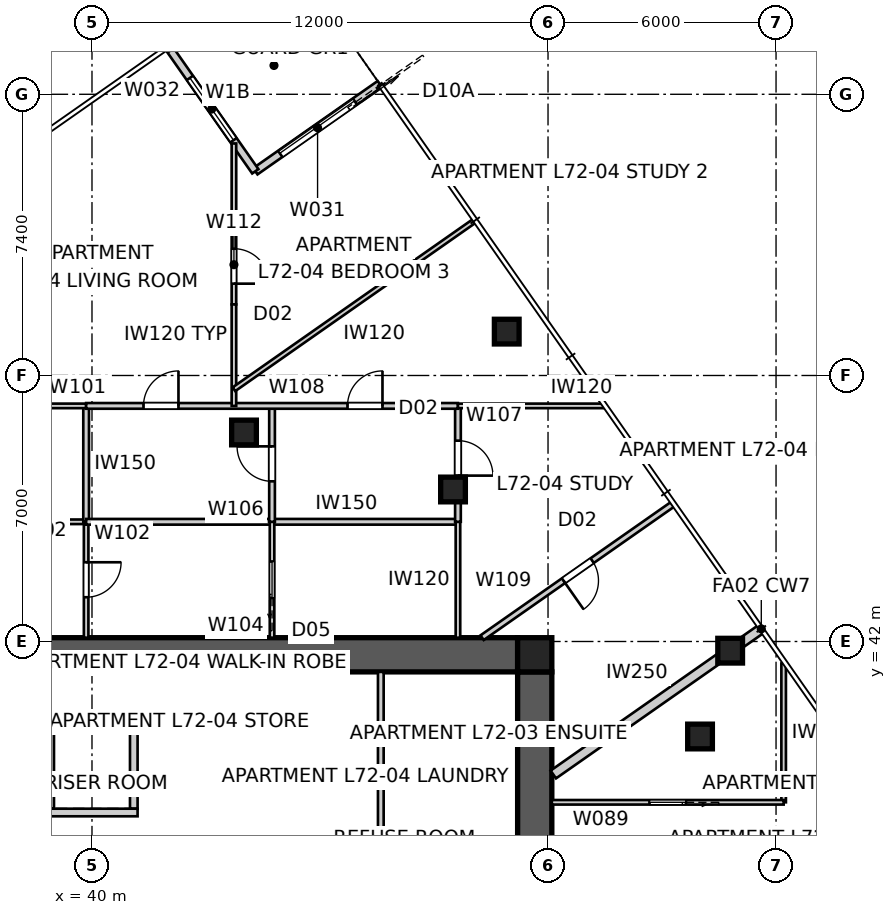
"""IFC4 building model, lengths in metres.
Left out: names, types, materials, properties, quantities, classifications, styles, units other than length and angle.
Written with IfcOpenShell. Run it as: python <this file> out.ifc"""

import sys

from ifc_helpers import new_model, si_unit, direction, frame, frame_2d, origin, origin_2d, place, context, subcontext, project, spatial, polyline, rectangle, outline, extrude, element, fill, save


model = new_model("IFC4")
c1 = context("Model", 3, precision=1e-05, world=origin(), true_north=direction((0.0, 1.0)))
c2 = subcontext(c1, "Body", "Model", "MODEL_VIEW")
j1 = project(units=[si_unit("LENGTHUNIT", "METRE"), si_unit("PLANEANGLEUNIT", "RADIAN")], contexts=[c1])
p1 = place(None, origin())
s1 = spatial("IfcSite", under=j1, at=p1, CompositionType="ELEMENT")
p2 = place(p1, origin())
s2 = spatial("IfcBuilding", under=s1, at=p2, CompositionType="ELEMENT")
p3 = place(p2, frame((0.0, 0.0, 260.8)))
s3 = spatial("IfcBuildingStorey", under=s2, at=p3, CompositionType="ELEMENT", Elevation=260.8)
p4 = place(p3, frame((28.8, 41.65, 0.0), z_axis=(0.0, 0.0, 1.0), x_axis=(1.0, 0.0, 0.0)))
e1 = element("IfcWall", 1, at=p4, inside=s3, PredefinedType="SHEAR", context=c2, shape_type="SweptSolid", body=[
    extrude(outline(polyline([(0.0, -0.45), (22.4, -0.45), (22.4, -0.025), (22.85, -0.025), (22.85, 0.025), (22.4, 0.025), (22.4, 0.45), (0.0, 0.45), (0.0, 0.025), (-0.45, 0.025), (-0.45, -0.025), (0.0, -0.025), (0.0, -0.45)])), origin(), (0.0, 0.0, 1.0), 3.4),
])
p5 = place(p3, frame((51.65, 18.8, 0.0), z_axis=(0.0, 0.0, 1.0), x_axis=(0.0, 1.0, 0.0)))
e2 = element("IfcWall", 2, at=p5, inside=s3, PredefinedType="SHEAR", context=c2, shape_type="SweptSolid", body=[
    extrude(outline(polyline([(0.0, -0.45), (22.4, -0.45), (22.4, -0.025), (22.85, -0.025), (22.85, 0.025), (22.4, 0.025), (22.4, 0.45), (0.0, 0.45), (0.0, 0.025), (-0.45, 0.025), (-0.45, -0.025), (0.0, -0.025), (0.0, -0.45)])), origin(), (0.0, 0.0, 1.0), 3.4),
])
p6 = place(p5, frame((11.14, 0.0, 0.0)))
e3 = element("IfcOpeningElement", 3, at=p6, cuts=e2, PredefinedType="OPENING", context=c2, shape_type="SweptSolid", body=[
    extrude(rectangle(XDim=1.02, YDim=2.4, at=frame_2d((0.51, 1.2))), frame((0.0, 0.46, 0.0), z_axis=(0.0, -1.0, 0.0), x_axis=(1.0, 0.0, 0.0)), (0.0, 0.0, 1.0), 0.92),
])
for number, where, z_axis, x_axis in (
    (4, (38.9, 37.6, 0.0), (0.0, 0.0, 1.0), (0.0, 1.0, 0.0)),
    (5, (41.1, 37.6, 0.0), (0.0, 0.0, 1.0), (0.0, 1.0, 0.0)),
):
    element("IfcWall", number, at=place(p3, frame(where, z_axis=z_axis, x_axis=x_axis)), inside=s3, PredefinedType="SOLIDWALL", context=c2, shape_type="SweptSolid", body=[
        extrude(rectangle(XDim=2.0, YDim=0.2, at=frame_2d((1.0, 0.0))), origin(), (0.0, 0.0, 1.0), 3.4),
    ])
for number, where, z_axis, x_axis in (
    (6, (38.8, 37.5, 0.0), (0.0, 0.0, 1.0), (1.0, 0.0, 0.0)),
    (7, (38.8, 39.7, 0.0), (0.0, 0.0, 1.0), (1.0, 0.0, 0.0)),
):
    element("IfcWall", number, at=place(p3, frame(where, z_axis=z_axis, x_axis=x_axis)), inside=s3, PredefinedType="SOLIDWALL", context=c2, shape_type="SweptSolid", body=[
        extrude(rectangle(XDim=2.4, YDim=0.2, at=frame_2d((1.2, 0.0))), origin(), (0.0, 0.0, 1.0), 3.4),
    ])
p7 = place(p3, frame((51.65, 41.65, 0.0), z_axis=(0.0, 0.0, 1.0), x_axis=(1.0, 0.0, 0.0)))
e8 = element("IfcColumn", 8, at=p7, inside=s3, PredefinedType="COLUMN", context=c2, shape_type="SweptSolid", body=[
    extrude(rectangle(XDim=0.9, YDim=0.9, at=origin_2d()), origin(), (0.0, 0.0, 1.0), 3.4),
])
for number, where, z_axis, x_axis in (
    (9, (56.793, 41.758, 0.0), (0.0, 0.0, 1.0), (1.0, 0.0, 0.0)),
    (10, (50.914, 50.155, 0.0), (0.0, 0.0, 1.0), (1.0, 0.0, 0.0)),
    (11, (56.0, 39.5, 0.0), (0.0, 0.0, 1.0), (1.0, 0.0, 0.0)),
    (12, (49.5, 46.0, 0.0), (0.0, 0.0, 1.0), (1.0, 0.0, 0.0)),
    (13, (44.0, 47.5, 0.0), (0.0, 0.0, 1.0), (1.0, 0.0, 0.0)),
):
    element("IfcColumn", number, at=place(p3, frame(where, z_axis=z_axis, x_axis=x_axis)), inside=s3, PredefinedType="COLUMN", context=c2, shape_type="SweptSolid", body=[
        extrude(rectangle(XDim=0.65, YDim=0.65, at=origin_2d()), origin(), (0.0, 0.0, 1.0), 3.4),
    ])
p8 = place(p3, frame((47.574, 56.667, 0.0), z_axis=(0.0, 0.0, 1.0), x_axis=(-0.819165963305, -0.573556557423, 0.0)))
e14 = element("IfcWall", 14, at=p8, inside=s3, PredefinedType="SOLIDWALL", context=c2, shape_type="SweptSolid", body=[
    extrude(rectangle(XDim=4.0, YDim=0.2, at=frame_2d((2.0, 0.0))), origin(), (0.0, 0.0, 1.0), 3.25),
])
p9 = place(p8, frame((0.8, 0.0, 0.0)))
e15 = element("IfcOpeningElement", 15, at=p9, cuts=e14, PredefinedType="OPENING", context=c2, shape_type="SweptSolid", body=[
    extrude(rectangle(XDim=2.4, YDim=2.1, at=frame_2d((1.2, 1.05))), frame((0.0, 0.11, 0.0), z_axis=(0.0, -1.0, 0.0), x_axis=(1.0, 0.0, 0.0)), (0.0, 0.0, 1.0), 0.22),
])
p10 = place(p3, frame((44.298, 54.373, 0.0), z_axis=(0.0, 0.0, 1.0), x_axis=(-0.573597512525, 0.819137286189, 0.0)))
e16 = element("IfcWall", 16, at=p10, inside=s3, PredefinedType="SOLIDWALL", context=c2, shape_type="SweptSolid", body=[
    extrude(rectangle(XDim=4.0, YDim=0.2, at=frame_2d((2.0, 0.0))), origin(), (0.0, 0.0, 1.0), 3.25),
])
p11 = place(p10, frame((1.0, 0.0, 0.45)))
e17 = element("IfcOpeningElement", 17, at=p11, cuts=e16, PredefinedType="OPENING", context=c2, shape_type="SweptSolid", body=[
    extrude(rectangle(XDim=2.0, YDim=1.8, at=frame_2d((1.0, 0.9))), frame((0.0, 0.11, 0.0), z_axis=(0.0, -1.0, 0.0), x_axis=(1.0, 0.0, 0.0)), (0.0, 0.0, 1.0), 0.22),
])
p12 = place(p3, frame((57.612, 42.332, 0.0), z_axis=(0.0, 0.0, 1.0), x_axis=(-0.819161528122, -0.573562891796, 0.0)))
e18 = element("IfcWall", 18, at=p12, inside=s3, PredefinedType="PARTITIONING", context=c2, shape_type="SweptSolid", body=[
    extrude(rectangle(XDim=6.681, YDim=0.25, at=frame_2d((3.341, 0.0))), origin(), (0.0, 0.0, 1.0), 3.25),
])
p13 = place(p3, frame((47.6, 41.2, 0.0), z_axis=(0.0, 0.0, 1.0), x_axis=(0.0, -1.0, 0.0)))
e19 = element("IfcWall", 19, at=p13, inside=s3, PredefinedType="SOLIDWALL", context=c2, shape_type="SweptSolid", body=[
    extrude(rectangle(XDim=5.9, YDim=0.15, at=frame_2d((2.95, 0.0))), origin(), (0.0, 0.0, 1.0), 3.25),
])
p14 = place(p3, frame((58.2, 41.422, 0.0), z_axis=(0.0, 0.0, 1.0), x_axis=(0.0, -1.0, 0.0)))
e20 = element("IfcWall", 20, at=p14, inside=s3, PredefinedType="PARTITIONING", context=c2, shape_type="SweptSolid", body=[
    extrude(rectangle(XDim=3.654, YDim=0.12, at=frame_2d((1.827, 0.0))), origin(), (0.0, 0.0, 1.0), 3.25),
])
p15 = place(p3, frame((58.2, 37.768, 0.0), z_axis=(0.0, 0.0, 1.0), x_axis=(-1.0, 0.0, 0.0)))
e21 = element("IfcWall", 21, at=p15, inside=s3, PredefinedType="PARTITIONING", context=c2, shape_type="SweptSolid", body=[
    extrude(rectangle(XDim=6.1, YDim=0.12, at=frame_2d((3.05, 0.0))), origin(), (0.0, 0.0, 1.0), 3.25),
])
p16 = place(p15, frame((2.57, 0.0, 0.0)))
e22 = element("IfcOpeningElement", 22, at=p16, cuts=e21, PredefinedType="OPENING", context=c2, shape_type="SweptSolid", body=[
    extrude(rectangle(XDim=0.96, YDim=2.1, at=frame_2d((0.48, 1.05))), frame((0.0, 0.07, 0.0), z_axis=(0.0, -1.0, 0.0), x_axis=(1.0, 0.0, 0.0)), (0.0, 0.0, 1.0), 0.14),
])
p17 = place(p3, frame((28.255, 45.148, 0.0), z_axis=(0.0, 0.0, 1.0), x_axis=(0.99999998913, 0.000147442917, 0.0)))
e23 = element("IfcWall", 23, at=p17, inside=s3, PredefinedType="PARTITIONING", context=c2, shape_type="SweptSolid", body=[
    extrude(rectangle(XDim=11.591, YDim=0.12, at=frame_2d((5.795, 0.0))), origin(), (0.0, 0.0, 1.0), 3.25),
])
p18 = place(p3, frame((39.846, 48.2, 0.0), z_axis=(0.0, 0.0, 1.0), x_axis=(0.0, -1.0, 0.0)))
e24 = element("IfcWall", 24, at=p18, inside=s3, PredefinedType="SOLIDWALL", context=c2, shape_type="SweptSolid", body=[
    extrude(rectangle(XDim=3.05, YDim=0.15, at=frame_2d((1.525, 0.0))), origin(), (0.0, 0.0, 1.0), 3.25),
])
p19 = place(p3, frame((33.907, 48.2, 0.0), z_axis=(0.0, 0.0, 1.0), x_axis=(1.0, 0.0, 0.0)))
e25 = element("IfcWall", 25, at=p19, inside=s3, PredefinedType="PARTITIONING", context=c2, shape_type="SweptSolid", body=[
    extrude(rectangle(XDim=5.939, YDim=0.12, at=frame_2d((2.969, 0.0))), origin(), (0.0, 0.0, 1.0), 3.25),
])
p20 = place(p19, frame((0.666, 0.0, 0.0)))
e26 = element("IfcOpeningElement", 26, at=p20, cuts=e25, PredefinedType="OPENING", context=c2, shape_type="SweptSolid", body=[
    extrude(rectangle(XDim=0.96, YDim=2.1, at=frame_2d((0.48, 1.05))), frame((0.0, 0.07, 0.0), z_axis=(0.0, -1.0, 0.0), x_axis=(1.0, 0.0, 0.0)), (0.0, 0.0, 1.0), 0.14),
])
p21 = place(p3, frame((39.846, 45.15, 0.0), z_axis=(0.0, 0.0, 1.0), x_axis=(0.0, -1.0, 0.0)))
e27 = element("IfcWall", 27, at=p21, inside=s3, PredefinedType="PARTITIONING", context=c2, shape_type="SweptSolid", body=[
    extrude(rectangle(XDim=3.05, YDim=0.12, at=frame_2d((1.525, 0.0))), origin(), (0.0, 0.0, 1.0), 3.25),
])
p22 = place(p21, frame((1.065, 0.0, 0.0)))
e28 = element("IfcOpeningElement", 28, at=p22, cuts=e27, PredefinedType="OPENING", context=c2, shape_type="SweptSolid", body=[
    extrude(rectangle(XDim=0.92, YDim=2.34, at=frame_2d((0.46, 1.17))), frame((0.0, 0.07, 0.0), z_axis=(0.0, -1.0, 0.0), x_axis=(1.0, 0.0, 0.0)), (0.0, 0.0, 1.0), 0.14),
])
p23 = place(p3, frame((39.846, 45.15, 0.0), z_axis=(0.0, 0.0, 1.0), x_axis=(1.0, 0.0, 0.0)))
e29 = element("IfcWall", 29, at=p23, inside=s3, PredefinedType="SOLIDWALL", context=c2, shape_type="SweptSolid", body=[
    extrude(rectangle(XDim=9.784, YDim=0.15, at=frame_2d((4.892, 0.0))), origin(), (0.0, 0.0, 1.0), 3.25),
])
p24 = place(p3, frame((44.738, 42.1, 0.0), z_axis=(0.0, 0.0, 1.0), x_axis=(0.0, 1.0, 0.0)))
e30 = element("IfcWall", 30, at=p24, inside=s3, PredefinedType="PARTITIONING", context=c2, shape_type="SweptSolid", body=[
    extrude(rectangle(XDim=3.05, YDim=0.12, at=frame_2d((1.525, 0.0))), origin(), (0.0, 0.0, 1.0), 3.25),
])
p25 = place(p24, frame((1.045, 0.0, 0.0)))
e31 = element("IfcOpeningElement", 31, at=p25, cuts=e30, PredefinedType="OPENING", context=c2, shape_type="SweptSolid", body=[
    extrude(rectangle(XDim=0.96, YDim=2.1, at=frame_2d((0.48, 1.05))), frame((0.0, 0.07, 0.0), z_axis=(0.0, -1.0, 0.0), x_axis=(1.0, 0.0, 0.0)), (0.0, 0.0, 1.0), 0.14),
])
p26 = place(p3, frame((49.63, 45.15, 0.0), z_axis=(0.0, 0.0, 1.0), x_axis=(0.0, -1.0, 0.0)))
e32 = element("IfcWall", 32, at=p26, inside=s3, PredefinedType="PARTITIONING", context=c2, shape_type="SweptSolid", body=[
    extrude(rectangle(XDim=3.05, YDim=0.12, at=frame_2d((1.525, 0.0))), origin(), (0.0, 0.0, 1.0), 3.25),
])
p27 = place(p3, frame((44.738, 45.15, 0.0), z_axis=(0.0, 0.0, 1.0), x_axis=(0.0, 1.0, 0.0)))
e33 = element("IfcWall", 33, at=p27, inside=s3, PredefinedType="SOLIDWALL", context=c2, shape_type="SweptSolid", body=[
    extrude(rectangle(XDim=3.05, YDim=0.15, at=frame_2d((1.525, 0.0))), origin(), (0.0, 0.0, 1.0), 3.25),
])
p28 = place(p27, frame((1.065, 0.0, 0.0)))
e34 = element("IfcOpeningElement", 34, at=p28, cuts=e33, PredefinedType="OPENING", context=c2, shape_type="SweptSolid", body=[
    extrude(rectangle(XDim=0.92, YDim=2.34, at=frame_2d((0.46, 1.17))), frame((0.0, 0.085, 0.0), z_axis=(0.0, -1.0, 0.0), x_axis=(1.0, 0.0, 0.0)), (0.0, 0.0, 1.0), 0.17),
])
p29 = place(p3, frame((49.63, 48.2, 0.0), z_axis=(0.0, 0.0, 1.0), x_axis=(0.0, -1.0, 0.0)))
e35 = element("IfcWall", 35, at=p29, inside=s3, PredefinedType="SOLIDWALL", context=c2, shape_type="SweptSolid", body=[
    extrude(rectangle(XDim=3.05, YDim=0.15, at=frame_2d((1.525, 0.0))), origin(), (0.0, 0.0, 1.0), 3.25),
])
p30 = place(p29, frame((0.915, 0.0, 0.0)))
e36 = element("IfcOpeningElement", 36, at=p30, cuts=e35, PredefinedType="OPENING", context=c2, shape_type="SweptSolid", body=[
    extrude(rectangle(XDim=0.92, YDim=2.34, at=frame_2d((0.46, 1.17))), frame((0.0, 0.085, 0.0), z_axis=(0.0, -1.0, 0.0), x_axis=(1.0, 0.0, 0.0)), (0.0, 0.0, 1.0), 0.17),
])
p31 = place(p3, frame((39.846, 48.2, 0.0), z_axis=(0.0, 0.0, 1.0), x_axis=(1.0, 0.0, 0.0)))
e37 = element("IfcWall", 37, at=p31, inside=s3, PredefinedType="SOLIDWALL", context=c2, shape_type="SweptSolid", body=[
    extrude(rectangle(XDim=9.784, YDim=0.15, at=frame_2d((4.892, 0.0))), origin(), (0.0, 0.0, 1.0), 3.25),
])
p32 = place(p31, frame((1.51, 0.0, 0.0)))
e38 = element("IfcOpeningElement", 38, at=p32, cuts=e37, PredefinedType="OPENING", context=c2, shape_type="SweptSolid", body=[
    extrude(rectangle(XDim=0.92, YDim=2.34, at=frame_2d((0.46, 1.17))), frame((0.0, 0.085, 0.0), z_axis=(0.0, -1.0, 0.0), x_axis=(1.0, 0.0, 0.0)), (0.0, 0.0, 1.0), 0.17),
])
p33 = place(p31, frame((6.878, 0.0, 0.0)))
e39 = element("IfcOpeningElement", 39, at=p33, cuts=e37, PredefinedType="OPENING", context=c2, shape_type="SweptSolid", body=[
    extrude(rectangle(XDim=0.92, YDim=2.34, at=frame_2d((0.46, 1.17))), frame((0.0, 0.085, 0.0), z_axis=(0.0, -1.0, 0.0), x_axis=(1.0, 0.0, 0.0)), (0.0, 0.0, 1.0), 0.17),
])
p34 = place(p3, frame((55.271, 45.605, 0.0), z_axis=(0.0, 0.0, 1.0), x_axis=(-0.819158711158, -0.573566914958, 0.0)))
e40 = element("IfcWall", 40, at=p34, inside=s3, PredefinedType="SOLIDWALL", context=c2, shape_type="SweptSolid", body=[
    extrude(rectangle(XDim=6.111, YDim=0.15, at=frame_2d((3.055, 0.0))), origin(), (0.0, 0.0, 1.0), 3.25),
])
p35 = place(p34, frame((2.575, 0.0, 0.0)))
e41 = element("IfcOpeningElement", 41, at=p35, cuts=e40, PredefinedType="OPENING", context=c2, shape_type="SweptSolid", body=[
    extrude(rectangle(XDim=0.92, YDim=2.34, at=frame_2d((0.46, 1.17))), frame((0.0, 0.085, 0.0), z_axis=(0.0, -1.0, 0.0), x_axis=(1.0, 0.0, 0.0)), (0.0, 0.0, 1.0), 0.17),
])
p36 = place(p3, frame((49.63, 48.2, 0.0), z_axis=(0.0, 0.0, 1.0), x_axis=(1.0, 0.0, 0.0)))
e42 = element("IfcWall", 42, at=p36, inside=s3, PredefinedType="PARTITIONING", context=c2, shape_type="SweptSolid", body=[
    extrude(rectangle(XDim=3.824, YDim=0.12, at=frame_2d((1.912, 0.0))), origin(), (0.0, 0.0, 1.0), 3.25),
])
p37 = place(p3, frame((43.735, 55.106, 0.0), z_axis=(0.0, 0.0, 1.0), x_axis=(0.0, -1.0, 0.0)))
e43 = element("IfcWall", 43, at=p37, inside=s3, PredefinedType="PARTITIONING", context=c2, shape_type="SweptSolid", body=[
    extrude(rectangle(XDim=2.144, YDim=0.12, at=frame_2d((1.072, 0.0))), origin(), (0.0, 0.0, 1.0), 3.25),
])
p38 = place(p3, frame((43.735, 52.962, 0.0), z_axis=(0.0, 0.0, 1.0), x_axis=(0.0, -1.0, 0.0)))
e44 = element("IfcWall", 44, at=p38, inside=s3, PredefinedType="PARTITIONING", context=c2, shape_type="SweptSolid", body=[
    extrude(rectangle(XDim=2.092, YDim=0.12, at=frame_2d((1.046, 0.0))), origin(), (0.0, 0.0, 1.0), 2.35),
])
p39 = place(p38, frame((0.625, 0.0, 0.0)))
e45 = element("IfcOpeningElement", 45, at=p39, cuts=e44, PredefinedType="OPENING", context=c2, shape_type="SweptSolid", body=[
    extrude(rectangle(XDim=0.92, YDim=2.34, at=frame_2d((0.46, 1.17))), frame((0.0, 0.07, 0.0), z_axis=(0.0, -1.0, 0.0), x_axis=(1.0, 0.0, 0.0)), (0.0, 0.0, 1.0), 0.14),
])
p40 = place(p3, frame((43.735, 50.87, 0.0), z_axis=(0.0, 0.0, 1.0), x_axis=(0.0, -1.0, 0.0)))
e46 = element("IfcWall", 46, at=p40, inside=s3, PredefinedType="PARTITIONING", context=c2, shape_type="SweptSolid", body=[
    extrude(rectangle(XDim=2.67, YDim=0.12, at=frame_2d((1.335, 0.0))), origin(), (0.0, 0.0, 1.0), 3.25),
])
p41 = place(p3, frame((50.051, 53.06, 0.0), z_axis=(0.0, 0.0, 1.0), x_axis=(-0.819161994693, -0.573562225439, 0.0)))
e47 = element("IfcWall", 47, at=p41, inside=s3, PredefinedType="PARTITIONING", context=c2, shape_type="SweptSolid", body=[
    extrude(rectangle(XDim=7.71, YDim=0.12, at=frame_2d((3.855, 0.0))), origin(), (0.0, 0.0, 1.0), 3.25),
])
p42 = place(p9, origin())
e48 = element("IfcDoor", 48, at=p42, inside=s3, OperationType="SLIDING_TO_LEFT", PredefinedType="DOOR", context=c2, shape_type="SweptSolid", body=[
    extrude(rectangle(XDim=2.4, YDim=2.1, at=frame_2d((1.2, 1.05))), frame((0.0, 0.025, 0.0), z_axis=(0.0, -1.0, 0.0), x_axis=(1.0, 0.0, 0.0)), (0.0, 0.0, 1.0), 0.05),
])
fill(e15, e48)
p43 = place(p11, origin())
e49 = element("IfcWindow", 49, at=p43, inside=s3, PartitioningType="SINGLE_PANEL", PredefinedType="WINDOW", context=c2, shape_type="SweptSolid", body=[
    extrude(rectangle(XDim=2.0, YDim=1.8, at=frame_2d((1.0, 0.9))), frame((0.0, 0.03, 0.0), z_axis=(0.0, -1.0, 0.0), x_axis=(1.0, 0.0, 0.0)), (0.0, 0.0, 1.0), 0.06),
])
fill(e17, e49)
p44 = place(p16, origin())
e50 = element("IfcDoor", 50, at=p44, inside=s3, OperationType="SLIDING_TO_LEFT", PredefinedType="DOOR", context=c2, shape_type="SweptSolid", body=[
    extrude(rectangle(XDim=0.96, YDim=2.1, at=frame_2d((0.48, 1.05))), frame((0.0, 0.025, 0.0), z_axis=(0.0, -1.0, 0.0), x_axis=(1.0, 0.0, 0.0)), (0.0, 0.0, 1.0), 0.05),
])
fill(e22, e50)
p45 = place(p39, origin())
e51 = element("IfcDoor", 51, at=p45, inside=s3, OperationType="SINGLE_SWING_RIGHT", PredefinedType="DOOR", context=c2, shape_type="SweptSolid", body=[
    extrude(rectangle(XDim=0.92, YDim=2.34, at=frame_2d((0.46, 1.17))), frame((0.0, 0.025, 0.0), z_axis=(0.0, -1.0, 0.0), x_axis=(1.0, 0.0, 0.0)), (0.0, 0.0, 1.0), 0.05),
])
fill(e45, e51)
p46 = place(p32, origin())
e52 = element("IfcDoor", 52, at=p46, inside=s3, OperationType="SINGLE_SWING_RIGHT", PredefinedType="DOOR", context=c2, shape_type="SweptSolid", body=[
    extrude(rectangle(XDim=0.92, YDim=2.34, at=frame_2d((0.46, 1.17))), frame((0.0, 0.025, 0.0), z_axis=(0.0, -1.0, 0.0), x_axis=(1.0, 0.0, 0.0)), (0.0, 0.0, 1.0), 0.05),
])
fill(e38, e52)
p47 = place(p22, origin())
e53 = element("IfcDoor", 53, at=p47, inside=s3, OperationType="SINGLE_SWING_LEFT", PredefinedType="DOOR", context=c2, shape_type="SweptSolid", body=[
    extrude(rectangle(XDim=0.92, YDim=2.34, at=frame_2d((0.46, 1.17))), frame((0.0, 0.025, 0.0), z_axis=(0.0, -1.0, 0.0), x_axis=(1.0, 0.0, 0.0)), (0.0, 0.0, 1.0), 0.05),
])
fill(e28, e53)
p48 = place(p28, origin())
e54 = element("IfcDoor", 54, at=p48, inside=s3, OperationType="SINGLE_SWING_RIGHT", PredefinedType="DOOR", context=c2, shape_type="SweptSolid", body=[
    extrude(rectangle(XDim=0.92, YDim=2.34, at=frame_2d((0.46, 1.17))), frame((0.0, 0.025, 0.0), z_axis=(0.0, -1.0, 0.0), x_axis=(1.0, 0.0, 0.0)), (0.0, 0.0, 1.0), 0.05),
])
fill(e34, e54)
p49 = place(p25, origin())
e55 = element("IfcDoor", 55, at=p49, inside=s3, OperationType="SLIDING_TO_LEFT", PredefinedType="DOOR", context=c2, shape_type="SweptSolid", body=[
    extrude(rectangle(XDim=0.96, YDim=2.1, at=frame_2d((0.48, 1.05))), frame((0.0, 0.025, 0.0), z_axis=(0.0, -1.0, 0.0), x_axis=(1.0, 0.0, 0.0)), (0.0, 0.0, 1.0), 0.05),
])
fill(e31, e55)
p50 = place(p33, origin())
e56 = element("IfcDoor", 56, at=p50, inside=s3, OperationType="SINGLE_SWING_RIGHT", PredefinedType="DOOR", context=c2, shape_type="SweptSolid", body=[
    extrude(rectangle(XDim=0.92, YDim=2.34, at=frame_2d((0.46, 1.17))), frame((0.0, 0.025, 0.0), z_axis=(0.0, -1.0, 0.0), x_axis=(1.0, 0.0, 0.0)), (0.0, 0.0, 1.0), 0.05),
])
fill(e39, e56)
p51 = place(p30, origin())
e57 = element("IfcDoor", 57, at=p51, inside=s3, OperationType="SINGLE_SWING_RIGHT", PredefinedType="DOOR", context=c2, shape_type="SweptSolid", body=[
    extrude(rectangle(XDim=0.92, YDim=2.34, at=frame_2d((0.46, 1.17))), frame((0.0, 0.025, 0.0), z_axis=(0.0, -1.0, 0.0), x_axis=(1.0, 0.0, 0.0)), (0.0, 0.0, 1.0), 0.05),
])
fill(e36, e57)
p52 = place(p35, origin())
e58 = element("IfcDoor", 58, at=p52, inside=s3, OperationType="SINGLE_SWING_RIGHT", PredefinedType="DOOR", context=c2, shape_type="SweptSolid", body=[
    extrude(rectangle(XDim=0.92, YDim=2.34, at=frame_2d((0.46, 1.17))), frame((0.0, 0.025, 0.0), z_axis=(0.0, -1.0, 0.0), x_axis=(1.0, 0.0, 0.0)), (0.0, 0.0, 1.0), 0.05),
])
fill(e41, e58)
save(model, sys.argv[1])
